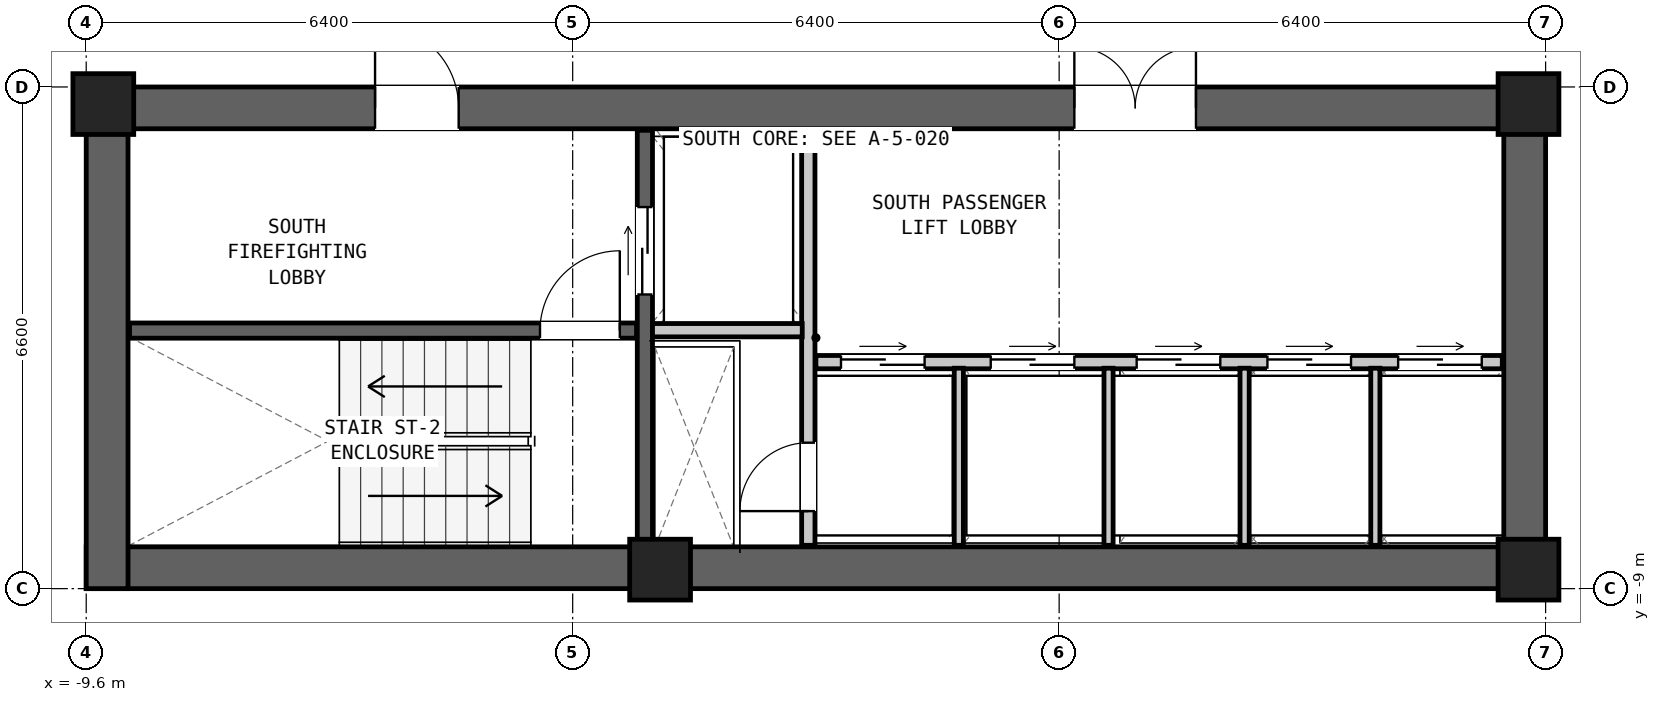
"""IFC4 building model, lengths in metres.
Left out: names, types, materials, properties, quantities, classifications, styles, units other than length and angle.
Written with IfcOpenShell. Run it as: python <this file> out.ifc"""

import sys

from ifc_helpers import new_model, si_unit, direction, frame, frame_2d, origin, origin_2d, place, context, subcontext, project, spatial, rectangle, extrude, element, fill, save


model = new_model("IFC4")
c1 = context("Model", 3, precision=1e-05, world=origin(), true_north=direction((0.0, 1.0)))
c2 = subcontext(c1, "Body", "Model", "MODEL_VIEW")
j1 = project(units=[si_unit("LENGTHUNIT", "METRE"), si_unit("PLANEANGLEUNIT", "RADIAN")], contexts=[c1])
p1 = place(None, origin())
s1 = spatial("IfcSite", under=j1, at=p1, CompositionType="ELEMENT")
p2 = place(p1, origin())
s2 = spatial("IfcBuilding", under=s1, at=p2, CompositionType="ELEMENT")
p3 = place(p2, frame((0.0, 0.0, 61.5)))
s3 = spatial("IfcBuildingStorey", under=s2, at=p3, CompositionType="ELEMENT", Elevation=61.5)
p4 = place(p3, frame((-9.6, -8.725, 0.0), z_axis=(0.0, 0.0, 1.0), x_axis=(1.0, 0.0, 0.0)))
e1 = element("IfcWall", 1, at=p4, inside=s3, PredefinedType="SHEAR", context=c2, shape_type="SweptSolid", body=[
    extrude(rectangle(XDim=19.2, YDim=0.55, at=frame_2d((9.6, 0.0))), origin(), (0.0, 0.0, 1.0), 3.6),
])
p5 = place(p3, frame((-9.6, -2.675, 0.0), z_axis=(0.0, 0.0, 1.0), x_axis=(1.0, 0.0, 0.0)))
e2 = element("IfcWall", 2, at=p5, inside=s3, PredefinedType="SHEAR", context=c2, shape_type="SweptSolid", body=[
    extrude(rectangle(XDim=19.2, YDim=0.55, at=frame_2d((9.6, 0.0))), origin(), (0.0, 0.0, 1.0), 3.6),
])
p6 = place(p5, frame((3.8, 0.0, 0.0)))
e3 = element("IfcOpeningElement", 3, at=p6, cuts=e2, PredefinedType="OPENING", context=c2, shape_type="SweptSolid", body=[
    extrude(rectangle(XDim=1.1, YDim=2.08, at=frame_2d((0.55, 1.04))), frame((0.0, 0.287, 0.0), z_axis=(0.0, -1.0, 0.0), x_axis=(1.0, 0.0, 0.0)), (0.0, 0.0, 1.0), 0.574),
])
p7 = place(p5, frame((13.0, 0.0, 0.0)))
e4 = element("IfcOpeningElement", 4, at=p7, cuts=e2, PredefinedType="OPENING", context=c2, shape_type="SweptSolid", body=[
    extrude(rectangle(XDim=1.6, YDim=2.12, at=frame_2d((0.8, 1.06))), frame((0.0, 0.287, 0.0), z_axis=(0.0, -1.0, 0.0), x_axis=(1.0, 0.0, 0.0)), (0.0, 0.0, 1.0), 0.574),
])
for number, where, z_axis, x_axis in (
    (5, (-9.325, -9.0, 0.0), (0.0, 0.0, 1.0), (0.0, 1.0, 0.0)),
    (6, (9.325, -9.0, 0.0), (0.0, 0.0, 1.0), (0.0, 1.0, 0.0)),
):
    element("IfcWall", number, at=place(p3, frame(where, z_axis=z_axis, x_axis=x_axis)), inside=s3, PredefinedType="SHEAR", context=c2, shape_type="SweptSolid", body=[
        extrude(rectangle(XDim=6.6, YDim=0.55, at=frame_2d((3.3, 0.0))), origin(), (0.0, 0.0, 1.0), 3.6),
    ])
for number, where, z_axis, x_axis in (
    (7, (-9.375, -2.625, 0.0), (0.0, 0.0, 1.0), (1.0, 0.0, 0.0)),
    (8, (9.375, -2.625, 0.0), (0.0, 0.0, 1.0), (1.0, 0.0, 0.0)),
    (9, (-2.05, -8.75, 0.0), (0.0, 0.0, 1.0), (1.0, 0.0, 0.0)),
    (10, (9.375, -8.75, 0.0), (0.0, 0.0, 1.0), (1.0, 0.0, 0.0)),
):
    element("IfcColumn", number, at=place(p3, frame(where, z_axis=z_axis, x_axis=x_axis)), inside=s3, PredefinedType="COLUMN", context=c2, shape_type="SweptSolid", body=[
        extrude(rectangle(XDim=0.8, YDim=0.8, at=origin_2d()), origin(), (0.0, 0.0, 1.0), 3.6),
    ])
p8 = place(p3, frame((-9.03, -5.605, 0.0), z_axis=(0.0, 0.0, 1.0), x_axis=(1.0, 0.0, 0.0)))
e11 = element("IfcWall", 11, at=p8, inside=s3, PredefinedType="SHEAR", context=c2, shape_type="SweptSolid", body=[
    extrude(rectangle(XDim=6.67, YDim=0.2, at=frame_2d((3.335, 0.0))), origin(), (0.0, 0.0, 1.0), 3.22),
])
p9 = place(p8, frame((5.4, 0.0, 0.0)))
e12 = element("IfcOpeningElement", 12, at=p9, cuts=e11, PredefinedType="OPENING", context=c2, shape_type="SweptSolid", body=[
    extrude(rectangle(XDim=1.05, YDim=2.08, at=frame_2d((0.525, 1.04))), frame((0.0, 0.112, 0.0), z_axis=(0.0, -1.0, 0.0), x_axis=(1.0, 0.0, 0.0)), (0.0, 0.0, 1.0), 0.224),
])
p10 = place(p3, frame((-2.25, -8.43, 0.0), z_axis=(0.0, 0.0, 1.0), x_axis=(0.0, 1.0, 0.0)))
e13 = element("IfcWall", 13, at=p10, inside=s3, PredefinedType="SHEAR", context=c2, shape_type="SweptSolid", body=[
    extrude(rectangle(XDim=5.46, YDim=0.2, at=frame_2d((2.73, 0.0))), origin(), (0.0, 0.0, 1.0), 3.22),
])
p11 = place(p10, frame((3.3, 0.0, 0.0)))
e14 = element("IfcOpeningElement", 14, at=p11, cuts=e13, PredefinedType="OPENING", context=c2, shape_type="SweptSolid", body=[
    extrude(rectangle(XDim=1.15, YDim=2.08, at=frame_2d((0.575, 1.04))), frame((0.0, 0.112, 0.0), z_axis=(0.0, -1.0, 0.0), x_axis=(1.0, 0.0, 0.0)), (0.0, 0.0, 1.0), 0.224),
])
p12 = place(p3, frame((-0.1, -8.43, 0.0), z_axis=(0.0, 0.0, 1.0), x_axis=(0.0, 1.0, 0.0)))
e15 = element("IfcWall", 15, at=p12, inside=s3, PredefinedType="PARTITIONING", context=c2, shape_type="SweptSolid", body=[
    extrude(rectangle(XDim=5.46, YDim=0.175, at=frame_2d((2.73, 0.0))), origin(), (0.0, 0.0, 1.0), 3.22),
])
p13 = place(p12, frame((0.45, 0.0, 0.0)))
e16 = element("IfcOpeningElement", 16, at=p13, cuts=e15, PredefinedType="OPENING", context=c2, shape_type="SweptSolid", body=[
    extrude(rectangle(XDim=0.9, YDim=2.05, at=frame_2d((0.45, 1.025))), frame((0.0, 0.1, 0.0), z_axis=(0.0, -1.0, 0.0), x_axis=(1.0, 0.0, 0.0)), (0.0, 0.0, 1.0), 0.199),
])
p14 = place(p3, frame((-2.15, -5.6, 0.0), z_axis=(0.0, 0.0, 1.0), x_axis=(1.0, 0.0, 0.0)))
e17 = element("IfcWall", 17, at=p14, inside=s3, PredefinedType="PARTITIONING", context=c2, shape_type="SweptSolid", body=[
    extrude(rectangle(XDim=1.97, YDim=0.175, at=frame_2d((0.985, 0.0))), origin(), (0.0, 0.0, 1.0), 3.22),
])
p15 = place(p3, frame((0.0, -6.02, 0.0), z_axis=(0.0, 0.0, 1.0), x_axis=(1.0, 0.0, 0.0)))
e18 = element("IfcWall", 18, at=p15, inside=s3, PredefinedType="PARTITIONING", context=c2, shape_type="SweptSolid", body=[
    extrude(rectangle(XDim=9.03, YDim=0.175, at=frame_2d((4.515, 0.0))), origin(), (0.0, 0.0, 1.0), 3.22),
])
p16 = place(p15, frame((0.33, 0.0, 0.0)))
e19 = element("IfcOpeningElement", 19, at=p16, cuts=e18, PredefinedType="OPENING", context=c2, shape_type="SweptSolid", body=[
    extrude(rectangle(XDim=1.1, YDim=2.06, at=frame_2d((0.55, 1.03))), frame((0.0, 0.1, 0.0), z_axis=(0.0, -1.0, 0.0), x_axis=(1.0, 0.0, 0.0)), (0.0, 0.0, 1.0), 0.199),
])
p17 = place(p15, frame((2.3, 0.0, 0.0)))
e20 = element("IfcOpeningElement", 20, at=p17, cuts=e18, PredefinedType="OPENING", context=c2, shape_type="SweptSolid", body=[
    extrude(rectangle(XDim=1.1, YDim=2.06, at=frame_2d((0.55, 1.03))), frame((0.0, 0.1, 0.0), z_axis=(0.0, -1.0, 0.0), x_axis=(1.0, 0.0, 0.0)), (0.0, 0.0, 1.0), 0.199),
])
p18 = place(p15, frame((4.22, 0.0, 0.0)))
e21 = element("IfcOpeningElement", 21, at=p18, cuts=e18, PredefinedType="OPENING", context=c2, shape_type="SweptSolid", body=[
    extrude(rectangle(XDim=1.1, YDim=2.06, at=frame_2d((0.55, 1.03))), frame((0.0, 0.1, 0.0), z_axis=(0.0, -1.0, 0.0), x_axis=(1.0, 0.0, 0.0)), (0.0, 0.0, 1.0), 0.199),
])
p19 = place(p15, frame((5.94, 0.0, 0.0)))
e22 = element("IfcOpeningElement", 22, at=p19, cuts=e18, PredefinedType="OPENING", context=c2, shape_type="SweptSolid", body=[
    extrude(rectangle(XDim=1.1, YDim=2.06, at=frame_2d((0.55, 1.03))), frame((0.0, 0.1, 0.0), z_axis=(0.0, -1.0, 0.0), x_axis=(1.0, 0.0, 0.0)), (0.0, 0.0, 1.0), 0.199),
])
p20 = place(p15, frame((7.66, 0.0, 0.0)))
e23 = element("IfcOpeningElement", 23, at=p20, cuts=e18, PredefinedType="OPENING", context=c2, shape_type="SweptSolid", body=[
    extrude(rectangle(XDim=1.1, YDim=2.06, at=frame_2d((0.55, 1.03))), frame((0.0, 0.1, 0.0), z_axis=(0.0, -1.0, 0.0), x_axis=(1.0, 0.0, 0.0)), (0.0, 0.0, 1.0), 0.199),
])
for number, where, z_axis, x_axis in (
    (24, (1.88, -8.43, 0.0), (0.0, 0.0, 1.0), (0.0, 1.0, 0.0)),
    (25, (3.85, -8.43, 0.0), (0.0, 0.0, 1.0), (0.0, 1.0, 0.0)),
    (26, (5.64, -8.43, 0.0), (0.0, 0.0, 1.0), (0.0, 1.0, 0.0)),
    (27, (7.36, -8.43, 0.0), (0.0, 0.0, 1.0), (0.0, 1.0, 0.0)),
):
    element("IfcWall", number, at=place(p3, frame(where, z_axis=z_axis, x_axis=x_axis)), inside=s3, PredefinedType="PARTITIONING", context=c2, shape_type="SweptSolid", body=[
        extrude(rectangle(XDim=2.33, YDim=0.12, at=frame_2d((1.165, 0.0))), origin(), (0.0, 0.0, 1.0), 3.22),
    ])
p21 = place(p9, origin())
e28 = element("IfcDoor", 28, at=p21, inside=s3, OperationType="SINGLE_SWING_RIGHT", PredefinedType="DOOR", context=c2, shape_type="SweptSolid", body=[
    extrude(rectangle(XDim=1.05, YDim=2.08, at=frame_2d((0.525, 1.04))), frame((0.0, 0.025, 0.0), z_axis=(0.0, -1.0, 0.0), x_axis=(1.0, 0.0, 0.0)), (0.0, 0.0, 1.0), 0.05),
])
fill(e12, e28)
p22 = place(p6, origin())
e29 = element("IfcDoor", 29, at=p22, inside=s3, OperationType="SINGLE_SWING_LEFT", PredefinedType="DOOR", context=c2, shape_type="SweptSolid", body=[
    extrude(rectangle(XDim=1.1, YDim=2.08, at=frame_2d((0.55, 1.04))), frame((0.0, 0.025, 0.0), z_axis=(0.0, -1.0, 0.0), x_axis=(1.0, 0.0, 0.0)), (0.0, 0.0, 1.0), 0.05),
])
fill(e3, e29)
p23 = place(p11, origin())
e30 = element("IfcDoor", 30, at=p23, inside=s3, OperationType="DOUBLE_DOOR_SLIDING", PredefinedType="DOOR", context=c2, shape_type="SweptSolid", body=[
    extrude(rectangle(XDim=1.15, YDim=2.08, at=frame_2d((0.575, 1.04))), frame((0.0, 0.025, 0.0), z_axis=(0.0, -1.0, 0.0), x_axis=(1.0, 0.0, 0.0)), (0.0, 0.0, 1.0), 0.05),
])
fill(e14, e30)
p24 = place(p13, origin())
e31 = element("IfcDoor", 31, at=p24, inside=s3, OperationType="SINGLE_SWING_LEFT", PredefinedType="DOOR", context=c2, shape_type="SweptSolid", body=[
    extrude(rectangle(XDim=0.9, YDim=2.05, at=frame_2d((0.45, 1.025))), frame((0.0, 0.025, 0.0), z_axis=(0.0, -1.0, 0.0), x_axis=(1.0, 0.0, 0.0)), (0.0, 0.0, 1.0), 0.05),
])
fill(e16, e31)
p25 = place(p16, origin())
e32 = element("IfcDoor", 32, at=p25, inside=s3, OperationType="DOUBLE_DOOR_SLIDING", PredefinedType="DOOR", context=c2, shape_type="SweptSolid", body=[
    extrude(rectangle(XDim=1.1, YDim=2.06, at=frame_2d((0.55, 1.03))), frame((0.0, 0.025, 0.0), z_axis=(0.0, -1.0, 0.0), x_axis=(1.0, 0.0, 0.0)), (0.0, 0.0, 1.0), 0.05),
])
fill(e19, e32)
p26 = place(p17, origin())
e33 = element("IfcDoor", 33, at=p26, inside=s3, OperationType="DOUBLE_DOOR_SLIDING", PredefinedType="DOOR", context=c2, shape_type="SweptSolid", body=[
    extrude(rectangle(XDim=1.1, YDim=2.06, at=frame_2d((0.55, 1.03))), frame((0.0, 0.025, 0.0), z_axis=(0.0, -1.0, 0.0), x_axis=(1.0, 0.0, 0.0)), (0.0, 0.0, 1.0), 0.05),
])
fill(e20, e33)
p27 = place(p7, origin())
e34 = element("IfcDoor", 34, at=p27, inside=s3, OperationType="DOUBLE_DOOR_SINGLE_SWING", PredefinedType="DOOR", context=c2, shape_type="SweptSolid", body=[
    extrude(rectangle(XDim=1.6, YDim=2.12, at=frame_2d((0.8, 1.06))), frame((0.0, 0.025, 0.0), z_axis=(0.0, -1.0, 0.0), x_axis=(1.0, 0.0, 0.0)), (0.0, 0.0, 1.0), 0.05),
])
fill(e4, e34)
p28 = place(p18, origin())
e35 = element("IfcDoor", 35, at=p28, inside=s3, OperationType="DOUBLE_DOOR_SLIDING", PredefinedType="DOOR", context=c2, shape_type="SweptSolid", body=[
    extrude(rectangle(XDim=1.1, YDim=2.06, at=frame_2d((0.55, 1.03))), frame((0.0, 0.025, 0.0), z_axis=(0.0, -1.0, 0.0), x_axis=(1.0, 0.0, 0.0)), (0.0, 0.0, 1.0), 0.05),
])
fill(e21, e35)
p29 = place(p19, origin())
e36 = element("IfcDoor", 36, at=p29, inside=s3, OperationType="DOUBLE_DOOR_SLIDING", PredefinedType="DOOR", context=c2, shape_type="SweptSolid", body=[
    extrude(rectangle(XDim=1.1, YDim=2.06, at=frame_2d((0.55, 1.03))), frame((0.0, 0.025, 0.0), z_axis=(0.0, -1.0, 0.0), x_axis=(1.0, 0.0, 0.0)), (0.0, 0.0, 1.0), 0.05),
])
fill(e22, e36)
p30 = place(p20, origin())
e37 = element("IfcDoor", 37, at=p30, inside=s3, OperationType="DOUBLE_DOOR_SLIDING", PredefinedType="DOOR", context=c2, shape_type="SweptSolid", body=[
    extrude(rectangle(XDim=1.1, YDim=2.06, at=frame_2d((0.55, 1.03))), frame((0.0, 0.025, 0.0), z_axis=(0.0, -1.0, 0.0), x_axis=(1.0, 0.0, 0.0)), (0.0, 0.0, 1.0), 0.05),
])
fill(e23, e37)
save(model, sys.argv[1])
